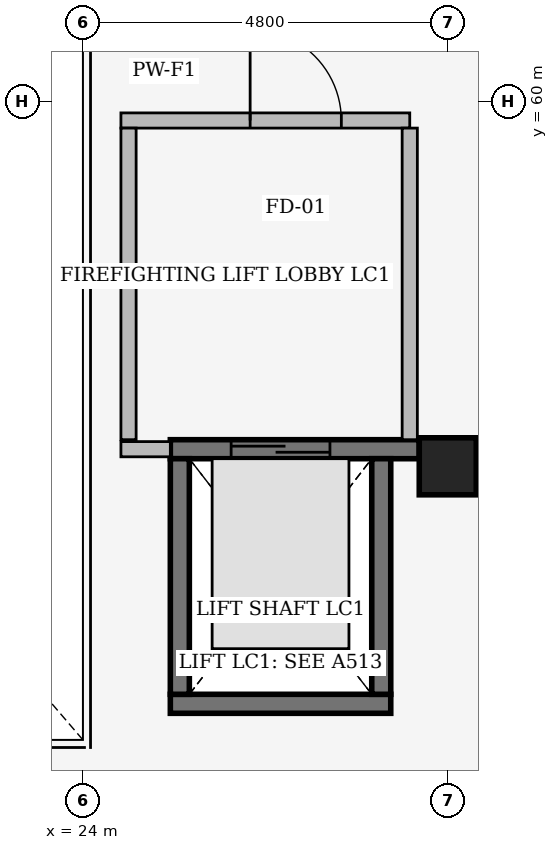
"""IFC4 building model, lengths in metres.
Left out: names, types, materials, properties, quantities, classifications, styles, units other than length and angle.
Written with IfcOpenShell. Run it as: python <this file> out.ifc"""

import sys

from ifc_helpers import new_model, si_unit, direction, frame, frame_2d, origin, origin_2d, place, context, subcontext, project, spatial, rectangle, extrude, element, fill, save


model = new_model("IFC4")
c1 = context("Model", 3, precision=1e-05, world=origin(), true_north=direction((0.0, 1.0)))
c2 = subcontext(c1, "Body", "Model", "MODEL_VIEW")
j1 = project(units=[si_unit("LENGTHUNIT", "METRE"), si_unit("PLANEANGLEUNIT", "RADIAN")], contexts=[c1])
p1 = place(None, origin())
s1 = spatial("IfcSite", under=j1, at=p1, CompositionType="ELEMENT")
p2 = place(p1, origin())
s2 = spatial("IfcBuilding", under=s1, at=p2, CompositionType="ELEMENT")
p3 = place(p2, frame((0.0, 0.0, 10.5)))
s3 = spatial("IfcBuildingStorey", under=s2, at=p3, CompositionType="ELEMENT", Elevation=10.5)
p4 = place(p3, frame((28.8, 55.2, 0.0), z_axis=(0.0, 0.0, 1.0), x_axis=(1.0, 0.0, 0.0)))
e1 = element("IfcColumn", 1, at=p4, inside=s3, PredefinedType="COLUMN", context=c2, shape_type="SweptSolid", body=[
    extrude(rectangle(XDim=0.75, YDim=0.75, at=origin_2d()), origin(), (0.0, 0.0, 1.0), 4.8),
])
p5 = place(p3, frame((25.15, 52.075, 0.0), z_axis=(0.0, 0.0, 1.0), x_axis=(1.0, 0.0, 0.0)))
e2 = element("IfcWall", 2, at=p5, inside=s3, PredefinedType="SHEAR", context=c2, shape_type="SweptSolid", body=[
    extrude(rectangle(XDim=2.9, YDim=0.25, at=frame_2d((1.45, 0.0))), origin(), (0.0, 0.0, 1.0), 4.4),
])
p6 = place(p3, frame((25.15, 55.425, 0.0), z_axis=(0.0, 0.0, 1.0), x_axis=(1.0, 0.0, 0.0)))
e3 = element("IfcWall", 3, at=p6, inside=s3, PredefinedType="SHEAR", context=c2, shape_type="SweptSolid", body=[
    extrude(rectangle(XDim=3.275, YDim=0.25, at=frame_2d((1.638, 0.0))), origin(), (0.0, 0.0, 1.0), 4.4),
])
p7 = place(p6, frame((0.8, 0.0, 0.0)))
e4 = element("IfcOpeningElement", 4, at=p7, cuts=e3, PredefinedType="OPENING", context=c2, shape_type="SweptSolid", body=[
    extrude(rectangle(XDim=1.3, YDim=2.2, at=frame_2d((0.65, 1.1))), frame((0.0, 0.135, 0.0), z_axis=(0.0, -1.0, 0.0), x_axis=(1.0, 0.0, 0.0)), (0.0, 0.0, 1.0), 0.27),
])
for number, where, z_axis, x_axis in (
    (5, (25.275, 52.2, 0.0), (0.0, 0.0, 1.0), (0.0, 1.0, 0.0)),
    (6, (27.925, 52.2, 0.0), (0.0, 0.0, 1.0), (0.0, 1.0, 0.0)),
):
    element("IfcWall", number, at=place(p3, frame(where, z_axis=z_axis, x_axis=x_axis)), inside=s3, PredefinedType="SHEAR", context=c2, shape_type="SweptSolid", body=[
        extrude(rectangle(XDim=3.1, YDim=0.25, at=frame_2d((1.55, 0.0))), origin(), (0.0, 0.0, 1.0), 4.4),
    ])
p8 = place(p3, frame((24.5, 59.75, 0.0), z_axis=(0.0, 0.0, 1.0), x_axis=(1.0, 0.0, 0.0)))
e7 = element("IfcWall", 7, at=p8, inside=s3, PredefinedType="PARTITIONING", context=c2, shape_type="SweptSolid", body=[
    extrude(rectangle(XDim=3.8, YDim=0.2, at=frame_2d((1.9, 0.0))), origin(), (0.0, 0.0, 1.0), 4.44),
])
p9 = place(p8, frame((1.7, 0.0, 0.0)))
e8 = element("IfcOpeningElement", 8, at=p9, cuts=e7, PredefinedType="OPENING", context=c2, shape_type="SweptSolid", body=[
    extrude(rectangle(XDim=1.2, YDim=2.2, at=frame_2d((0.6, 1.1))), frame((0.0, 0.11, 0.0), z_axis=(0.0, -1.0, 0.0), x_axis=(1.0, 0.0, 0.0)), (0.0, 0.0, 1.0), 0.22),
])
for number, where, z_axis, x_axis in (
    (9, (24.6, 55.55, 0.0), (0.0, 0.0, 1.0), (0.0, 1.0, 0.0)),
    (10, (28.3, 55.55, 0.0), (0.0, 0.0, 1.0), (0.0, 1.0, 0.0)),
):
    element("IfcWall", number, at=place(p3, frame(where, z_axis=z_axis, x_axis=x_axis)), inside=s3, PredefinedType="PARTITIONING", context=c2, shape_type="SweptSolid", body=[
        extrude(rectangle(XDim=4.1, YDim=0.2, at=frame_2d((2.05, 0.0))), origin(), (0.0, 0.0, 1.0), 4.44),
    ])
p10 = place(p3, frame((24.5, 55.425, 0.0), z_axis=(0.0, 0.0, 1.0), x_axis=(1.0, 0.0, 0.0)))
e11 = element("IfcWall", 11, at=p10, inside=s3, PredefinedType="PARTITIONING", context=c2, shape_type="SweptSolid", body=[
    extrude(rectangle(XDim=0.65, YDim=0.2, at=frame_2d((0.325, 0.0))), origin(), (0.0, 0.0, 1.0), 4.44),
])
p11 = place(p7, origin())
e12 = element("IfcDoor", 12, at=p11, inside=s3, OperationType="DOUBLE_DOOR_SLIDING", PredefinedType="DOOR", context=c2, shape_type="SweptSolid", body=[
    extrude(rectangle(XDim=1.3, YDim=2.2, at=frame_2d((0.65, 1.1))), frame((0.0, 0.025, 0.0), z_axis=(0.0, -1.0, 0.0), x_axis=(1.0, 0.0, 0.0)), (0.0, 0.0, 1.0), 0.05),
])
fill(e4, e12)
p12 = place(p9, origin())
e13 = element("IfcDoor", 13, at=p12, inside=s3, OperationType="SINGLE_SWING_LEFT", PredefinedType="DOOR", context=c2, shape_type="SweptSolid", body=[
    extrude(rectangle(XDim=1.2, YDim=2.2, at=frame_2d((0.6, 1.1))), frame((0.0, 0.025, 0.0), z_axis=(0.0, -1.0, 0.0), x_axis=(1.0, 0.0, 0.0)), (0.0, 0.0, 1.0), 0.05),
])
fill(e8, e13)
save(model, sys.argv[1])
